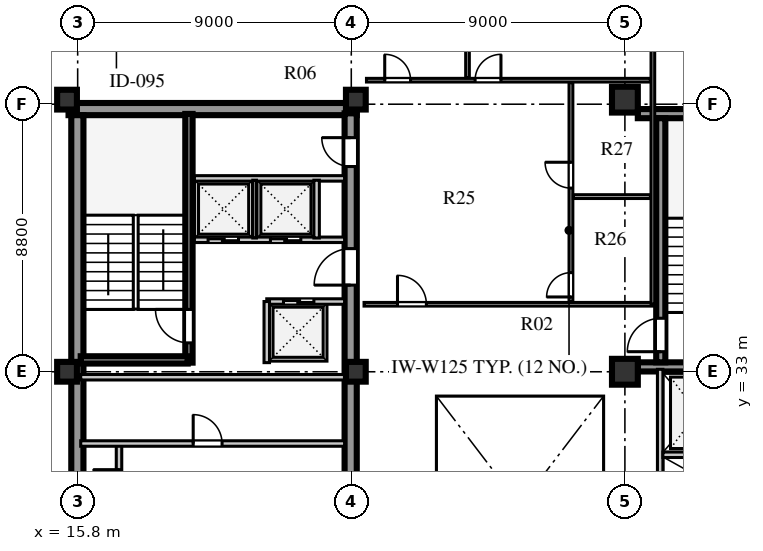
"""IFC4 building model, lengths in metres.
Left out: names, types, materials, properties, quantities, classifications, styles, units other than length and angle.
Written with IfcOpenShell. Run it as: python <this file> out.ifc"""

import sys

from ifc_helpers import new_model, si_unit, direction, frame, frame_2d, origin, origin_2d, place, context, subcontext, project, spatial, rectangle, extrude, element, fill, save


model = new_model("IFC4")
c1 = context("Model", 3, precision=1e-05, world=origin(), true_north=direction((0.0, 1.0)))
c2 = subcontext(c1, "Body", "Model", "MODEL_VIEW")
j1 = project(units=[si_unit("LENGTHUNIT", "METRE"), si_unit("PLANEANGLEUNIT", "RADIAN")], contexts=[c1])
p1 = place(None, origin())
s1 = spatial("IfcSite", under=j1, at=p1, CompositionType="ELEMENT")
p2 = place(p1, origin())
s2 = spatial("IfcBuilding", under=s1, at=p2, CompositionType="ELEMENT")
p3 = place(p2, frame((0.0, 0.0, 221.9)))
s3 = spatial("IfcBuildingStorey", under=s2, at=p3, CompositionType="ELEMENT", Elevation=221.9)
p4 = place(p3, frame((15.5, 41.64, 0.0), z_axis=(0.0, 0.0, 1.0), x_axis=(1.0, 0.0, 0.0)))
e1 = element("IfcWall", 1, at=p4, inside=s3, PredefinedType="SHEAR", context=c2, shape_type="SweptSolid", body=[
    extrude(rectangle(XDim=9.48, YDim=0.4, at=frame_2d((4.74, 0.0))), origin(), (0.0, 0.0, 1.0), 3.66),
])
p5 = place(p3, frame((15.79, 15.81, 0.0), z_axis=(0.0, 0.0, 1.0), x_axis=(0.0, 1.0, 0.0)))
e2 = element("IfcWall", 2, at=p5, inside=s3, PredefinedType="SHEAR", context=c2, shape_type="SweptSolid", body=[
    extrude(rectangle(XDim=25.63, YDim=0.4, at=frame_2d((12.815, 0.0))), origin(), (0.0, 0.0, 1.0), 3.66),
])
p6 = place(p3, frame((24.78, 15.74, 0.0), z_axis=(0.0, 0.0, 1.0), x_axis=(0.0, 1.0, 0.0)))
e3 = element("IfcWall", 3, at=p6, inside=s3, PredefinedType="SHEAR", context=c2, shape_type="SweptSolid", body=[
    extrude(rectangle(XDim=25.76, YDim=0.4, at=frame_2d((12.88, 0.0))), origin(), (0.0, 0.0, 1.0), 3.66),
])
p7 = place(p6, frame((1.61, 0.0, 0.0)))
e4 = element("IfcOpeningElement", 4, at=p7, cuts=e3, PredefinedType="OPENING", context=c2, shape_type="SweptSolid", body=[
    extrude(rectangle(XDim=1.2, YDim=2.1, at=frame_2d((0.6, 1.05))), frame((0.0, 0.21, 0.0), z_axis=(0.0, -1.0, 0.0), x_axis=(1.0, 0.0, 0.0)), (0.0, 0.0, 1.0), 0.42),
])
p8 = place(p6, frame((6.78, 0.0, 0.0)))
e5 = element("IfcOpeningElement", 5, at=p8, cuts=e3, PredefinedType="OPENING", context=c2, shape_type="SweptSolid", body=[
    extrude(rectangle(XDim=0.85, YDim=2.06, at=frame_2d((0.425, 1.03))), frame((0.0, 0.21, 0.0), z_axis=(0.0, -1.0, 0.0), x_axis=(1.0, 0.0, 0.0)), (0.0, 0.0, 1.0), 0.42),
])
p9 = place(p6, frame((12.11, 0.0, 0.0)))
e6 = element("IfcOpeningElement", 6, at=p9, cuts=e3, PredefinedType="OPENING", context=c2, shape_type="SweptSolid", body=[
    extrude(rectangle(XDim=1.5, YDim=2.12, at=frame_2d((0.75, 1.06))), frame((0.0, 0.21, 0.0), z_axis=(0.0, -1.0, 0.0), x_axis=(1.0, 0.0, 0.0)), (0.0, 0.0, 1.0), 0.42),
])
p10 = place(p6, frame((20.11, 0.0, 0.0)))
e7 = element("IfcOpeningElement", 7, at=p10, cuts=e3, PredefinedType="OPENING", context=c2, shape_type="SweptSolid", body=[
    extrude(rectangle(XDim=1.2, YDim=2.12, at=frame_2d((0.6, 1.06))), frame((0.0, 0.21, 0.0), z_axis=(0.0, -1.0, 0.0), x_axis=(1.0, 0.0, 0.0)), (0.0, 0.0, 1.0), 0.42),
])
p11 = place(p6, frame((24.01, 0.0, 0.0)))
e8 = element("IfcOpeningElement", 8, at=p11, cuts=e3, PredefinedType="OPENING", context=c2, shape_type="SweptSolid", body=[
    extrude(rectangle(XDim=0.95, YDim=2.1, at=frame_2d((0.475, 1.05))), frame((0.0, 0.21, 0.0), z_axis=(0.0, -1.0, 0.0), x_axis=(1.0, 0.0, 0.0)), (0.0, 0.0, 1.0), 0.42),
])
for number, where, z_axis, x_axis in (
    (9, (34.225, 33.16, 0.0), (0.0, 0.0, 1.0), (1.0, 0.0, 0.0)),
    (10, (34.225, 41.49, 0.0), (0.0, 0.0, 1.0), (1.0, 0.0, 0.0)),
):
    element("IfcWall", number, at=place(p3, frame(where, z_axis=z_axis, x_axis=x_axis)), inside=s3, PredefinedType="SHEAR", context=c2, shape_type="SweptSolid", body=[
        extrude(rectangle(XDim=4.645, YDim=0.3, at=frame_2d((2.323, 0.0))), origin(), (0.0, 0.0, 1.0), 3.66),
    ])
p12 = place(p3, frame((34.98, 33.31, 0.0), z_axis=(0.0, 0.0, 1.0), x_axis=(0.0, 1.0, 0.0)))
e11 = element("IfcWall", 11, at=p12, inside=s3, PredefinedType="SHEAR", context=c2, shape_type="SweptSolid", body=[
    extrude(rectangle(XDim=8.03, YDim=0.3, at=frame_2d((4.015, 0.0))), origin(), (0.0, 0.0, 1.0), 3.66),
])
p13 = place(p12, frame((0.35, 0.0, 0.0)))
e12 = element("IfcOpeningElement", 12, at=p13, cuts=e11, PredefinedType="OPENING", context=c2, shape_type="SweptSolid", body=[
    extrude(rectangle(XDim=1.1, YDim=2.1, at=frame_2d((0.55, 1.05))), frame((0.0, 0.16, 0.0), z_axis=(0.0, -1.0, 0.0), x_axis=(1.0, 0.0, 0.0)), (0.0, 0.0, 1.0), 0.32),
])
for number, where, z_axis, x_axis in (
    (13, (15.45, 33.0, 0.0), (0.0, 0.0, 1.0), (1.0, 0.0, 0.0)),
    (14, (15.45, 41.95, 0.0), (0.0, 0.0, 1.0), (1.0, 0.0, 0.0)),
    (15, (24.95, 33.0, 0.0), (0.0, 0.0, 1.0), (1.0, 0.0, 0.0)),
    (16, (24.95, 41.95, 0.0), (0.0, 0.0, 1.0), (1.0, 0.0, 0.0)),
):
    element("IfcColumn", number, at=place(p3, frame(where, z_axis=z_axis, x_axis=x_axis)), inside=s3, PredefinedType="COLUMN", context=c2, shape_type="SweptSolid", body=[
        extrude(rectangle(XDim=0.65, YDim=0.65, at=origin_2d()), origin(), (0.0, 0.0, 1.0), 3.66),
    ])
for number, where, z_axis, x_axis in (
    (17, (33.8, 33.0, 0.0), (0.0, 0.0, 1.0), (1.0, 0.0, 0.0)),
    (18, (33.8, 41.95, 0.0), (0.0, 0.0, 1.0), (1.0, 0.0, 0.0)),
):
    element("IfcColumn", number, at=place(p3, frame(where, z_axis=z_axis, x_axis=x_axis)), inside=s3, PredefinedType="COLUMN", context=c2, shape_type="SweptSolid", body=[
        extrude(rectangle(XDim=0.85, YDim=0.85, at=origin_2d()), origin(), (0.0, 0.0, 1.0), 3.66),
    ])
p14 = place(p3, frame((17.16, 26.58, 0.0), z_axis=(0.0, 0.0, 1.0), x_axis=(0.0, 1.0, 0.0)))
e19 = element("IfcWall", 19, at=p14, inside=s3, PredefinedType="SOLIDWALL", context=c2, shape_type="SweptSolid", body=[
    extrude(rectangle(XDim=4.02, YDim=0.18, at=frame_2d((2.01, 0.0))), origin(), (0.0, 0.0, 1.0), 3.66),
])
p15 = place(p14, frame((2.35, 0.0, 0.0)))
e20 = element("IfcOpeningElement", 20, at=p15, cuts=e19, PredefinedType="OPENING", context=c2, shape_type="SweptSolid", body=[
    extrude(rectangle(XDim=0.85, YDim=2.06, at=frame_2d((0.425, 1.03))), frame((0.0, 0.1, 0.0), z_axis=(0.0, -1.0, 0.0), x_axis=(1.0, 0.0, 0.0)), (0.0, 0.0, 1.0), 0.2),
])
p16 = place(p3, frame((15.9, 30.64, 0.0), z_axis=(0.0, 0.0, 1.0), x_axis=(1.0, 0.0, 0.0)))
e21 = element("IfcWall", 21, at=p16, inside=s3, PredefinedType="SOLIDWALL", context=c2, shape_type="SweptSolid", body=[
    extrude(rectangle(XDim=8.68, YDim=0.18, at=frame_2d((4.34, 0.0))), origin(), (0.0, 0.0, 1.0), 3.66),
])
p17 = place(p16, frame((3.7, 0.0, 0.0)))
e22 = element("IfcOpeningElement", 22, at=p17, cuts=e21, PredefinedType="OPENING", context=c2, shape_type="SweptSolid", body=[
    extrude(rectangle(XDim=0.95, YDim=2.1, at=frame_2d((0.475, 1.05))), frame((0.0, 0.1, 0.0), z_axis=(0.0, -1.0, 0.0), x_axis=(1.0, 0.0, 0.0)), (0.0, 0.0, 1.0), 0.2),
])
p18 = place(p3, frame((15.9, 32.82, 0.0), z_axis=(0.0, 0.0, 1.0), x_axis=(1.0, 0.0, 0.0)))
e23 = element("IfcWall", 23, at=p18, inside=s3, PredefinedType="SOLIDWALL", context=c2, shape_type="SweptSolid", body=[
    extrude(rectangle(XDim=8.68, YDim=0.18, at=frame_2d((4.34, 0.0))), origin(), (0.0, 0.0, 1.0), 3.06),
])
p19 = place(p3, frame((19.46, 33.3, 0.0), z_axis=(0.0, 0.0, 1.0), x_axis=(0.0, 1.0, 0.0)))
e24 = element("IfcWall", 24, at=p19, inside=s3, PredefinedType="SHEAR", context=c2, shape_type="SweptSolid", body=[
    extrude(rectangle(XDim=8.18, YDim=0.24, at=frame_2d((4.09, 0.0))), origin(), (0.0, 0.0, 1.0), 3.9),
])
p20 = place(p19, frame((0.65, 0.0, 0.0)))
e25 = element("IfcOpeningElement", 25, at=p20, cuts=e24, PredefinedType="OPENING", context=c2, shape_type="SweptSolid", body=[
    extrude(rectangle(XDim=1.1, YDim=2.1, at=frame_2d((0.55, 1.05))), frame((0.0, 0.13, 0.0), z_axis=(0.0, -1.0, 0.0), x_axis=(1.0, 0.0, 0.0)), (0.0, 0.0, 1.0), 0.26),
])
p21 = place(p3, frame((15.9, 33.39, 0.0), z_axis=(0.0, 0.0, 1.0), x_axis=(1.0, 0.0, 0.0)))
e26 = element("IfcWall", 26, at=p21, inside=s3, PredefinedType="SHEAR", context=c2, shape_type="SweptSolid", body=[
    extrude(rectangle(XDim=3.52, YDim=0.24, at=frame_2d((1.76, 0.0))), origin(), (0.0, 0.0, 1.0), 3.9),
])
p22 = place(p3, frame((22.02, 35.31, 0.0), z_axis=(0.0, 0.0, 1.0), x_axis=(1.0, 0.0, 0.0)))
e27 = element("IfcWall", 27, at=p22, inside=s3, PredefinedType="SOLIDWALL", context=c2, shape_type="SweptSolid", body=[
    extrude(rectangle(XDim=2.56, YDim=0.18, at=frame_2d((1.28, 0.0))), origin(), (0.0, 0.0, 1.0), 3.66),
])
p23 = place(p22, frame((0.55, 0.0, 0.0)))
e28 = element("IfcOpeningElement", 28, at=p23, cuts=e27, PredefinedType="OPENING", context=c2, shape_type="SweptSolid", body=[
    extrude(rectangle(XDim=1.0, YDim=2.1, at=frame_2d((0.5, 1.05))), frame((0.0, 0.1, 0.0), z_axis=(0.0, -1.0, 0.0), x_axis=(1.0, 0.0, 0.0)), (0.0, 0.0, 1.0), 0.2),
])
p24 = place(p3, frame((22.02, 33.3, 0.0), z_axis=(0.0, 0.0, 1.0), x_axis=(0.0, 1.0, 0.0)))
e29 = element("IfcWall", 29, at=p24, inside=s3, PredefinedType="SOLIDWALL", context=c2, shape_type="SweptSolid", body=[
    extrude(rectangle(XDim=2.01, YDim=0.18, at=frame_2d((1.005, 0.0))), origin(), (0.0, 0.0, 1.0), 3.66),
])
p25 = place(p3, frame((19.64, 37.34, 0.0), z_axis=(0.0, 0.0, 1.0), x_axis=(1.0, 0.0, 0.0)))
e30 = element("IfcWall", 30, at=p25, inside=s3, PredefinedType="SOLIDWALL", context=c2, shape_type="SweptSolid", body=[
    extrude(rectangle(XDim=4.94, YDim=0.18, at=frame_2d((2.47, 0.0))), origin(), (0.0, 0.0, 1.0), 3.66),
])
p26 = place(p25, frame((0.45, 0.0, 0.0)))
e31 = element("IfcOpeningElement", 31, at=p26, cuts=e30, PredefinedType="OPENING", context=c2, shape_type="SweptSolid", body=[
    extrude(rectangle(XDim=1.0, YDim=2.1, at=frame_2d((0.5, 1.05))), frame((0.0, 0.1, 0.0), z_axis=(0.0, -1.0, 0.0), x_axis=(1.0, 0.0, 0.0)), (0.0, 0.0, 1.0), 0.2),
])
p27 = place(p25, frame((2.5, 0.0, 0.0)))
e32 = element("IfcOpeningElement", 32, at=p27, cuts=e30, PredefinedType="OPENING", context=c2, shape_type="SweptSolid", body=[
    extrude(rectangle(XDim=1.0, YDim=2.1, at=frame_2d((0.5, 1.05))), frame((0.0, 0.1, 0.0), z_axis=(0.0, -1.0, 0.0), x_axis=(1.0, 0.0, 0.0)), (0.0, 0.0, 1.0), 0.2),
])
p28 = place(p3, frame((19.64, 39.36, 0.0), z_axis=(0.0, 0.0, 1.0), x_axis=(1.0, 0.0, 0.0)))
e33 = element("IfcWall", 33, at=p28, inside=s3, PredefinedType="SOLIDWALL", context=c2, shape_type="SweptSolid", body=[
    extrude(rectangle(XDim=4.94, YDim=0.18, at=frame_2d((2.47, 0.0))), origin(), (0.0, 0.0, 1.0), 3.66),
])
p29 = place(p3, frame((21.62, 37.4, 0.0), z_axis=(0.0, 0.0, 1.0), x_axis=(0.0, 1.0, 0.0)))
e34 = element("IfcWall", 34, at=p29, inside=s3, PredefinedType="PARTITIONING", context=c2, shape_type="SweptSolid", body=[
    extrude(rectangle(XDim=1.9, YDim=0.12, at=frame_2d((0.95, 0.0))), origin(), (0.0, 0.0, 1.0), 3.66),
])
p30 = place(p3, frame((23.66, 37.4, 0.0), z_axis=(0.0, 0.0, 1.0), x_axis=(0.0, 1.0, 0.0)))
e35 = element("IfcWall", 35, at=p30, inside=s3, PredefinedType="SOLIDWALL", context=c2, shape_type="SweptSolid", body=[
    extrude(rectangle(XDim=1.9, YDim=0.18, at=frame_2d((0.95, 0.0))), origin(), (0.0, 0.0, 1.0), 3.66),
])
p31 = place(p3, frame((34.96, 28.86, 0.0), z_axis=(0.0, 0.0, 1.0), x_axis=(0.0, 1.0, 0.0)))
e36 = element("IfcWall", 36, at=p31, inside=s3, PredefinedType="SOLIDWALL", context=c2, shape_type="SweptSolid", body=[
    extrude(rectangle(XDim=4.22, YDim=0.18, at=frame_2d((2.11, 0.0))), origin(), (0.0, 0.0, 1.0), 3.66),
])
p32 = place(p3, frame((35.05, 30.27, 0.0), z_axis=(0.0, 0.0, 1.0), x_axis=(1.0, 0.0, 0.0)))
e37 = element("IfcWall", 37, at=p32, inside=s3, PredefinedType="SOLIDWALL", context=c2, shape_type="SweptSolid", body=[
    extrude(rectangle(XDim=2.25, YDim=0.18, at=frame_2d((1.125, 0.0))), origin(), (0.0, 0.0, 1.0), 3.66),
])
p33 = place(p3, frame((25.22, 35.22, 0.0), z_axis=(0.0, 0.0, 1.0), x_axis=(1.0, 0.0, 0.0)))
e38 = element("IfcWall", 38, at=p33, inside=s3, PredefinedType="PARTITIONING", context=c2, shape_type="SweptSolid", body=[
    extrude(rectangle(XDim=9.5, YDim=0.12, at=frame_2d((4.75, 0.0))), origin(), (0.0, 0.0, 1.0), 3.66),
])
p34 = place(p33, frame((1.1, 0.0, 0.0)))
e39 = element("IfcOpeningElement", 39, at=p34, cuts=e38, PredefinedType="OPENING", context=c2, shape_type="SweptSolid", body=[
    extrude(rectangle(XDim=0.95, YDim=2.1, at=frame_2d((0.475, 1.05))), frame((0.0, 0.07, 0.0), z_axis=(0.0, -1.0, 0.0), x_axis=(1.0, 0.0, 0.0)), (0.0, 0.0, 1.0), 0.14),
])
p35 = place(p3, frame((34.72, 35.22, 0.0), z_axis=(0.0, 0.0, 1.0), x_axis=(0.0, 1.0, 0.0)))
e40 = element("IfcWall", 40, at=p35, inside=s3, PredefinedType="PARTITIONING", context=c2, shape_type="SweptSolid", body=[
    extrude(rectangle(XDim=14.1, YDim=0.12, at=frame_2d((7.05, 0.0))), origin(), (0.0, 0.0, 1.0), 3.66),
])
p36 = place(p3, frame((25.3, 42.59, 0.0), z_axis=(0.0, 0.0, 1.0), x_axis=(1.0, 0.0, 0.0)))
e41 = element("IfcWall", 41, at=p36, inside=s3, PredefinedType="PARTITIONING", context=c2, shape_type="SweptSolid", body=[
    extrude(rectangle(XDim=9.34, YDim=0.12, at=frame_2d((4.67, 0.0))), origin(), (0.0, 0.0, 1.0), 3.66),
])
p37 = place(p36, frame((0.6, 0.0, 0.0)))
e42 = element("IfcOpeningElement", 42, at=p37, cuts=e41, PredefinedType="OPENING", context=c2, shape_type="SweptSolid", body=[
    extrude(rectangle(XDim=0.85, YDim=2.08, at=frame_2d((0.425, 1.04))), frame((0.0, 0.07, 0.0), z_axis=(0.0, -1.0, 0.0), x_axis=(1.0, 0.0, 0.0)), (0.0, 0.0, 1.0), 0.14),
])
p38 = place(p36, frame((3.573, 0.0, 0.0)))
e43 = element("IfcOpeningElement", 43, at=p38, cuts=e41, PredefinedType="OPENING", context=c2, shape_type="SweptSolid", body=[
    extrude(rectangle(XDim=0.85, YDim=2.08, at=frame_2d((0.425, 1.04))), frame((0.0, 0.07, 0.0), z_axis=(0.0, -1.0, 0.0), x_axis=(1.0, 0.0, 0.0)), (0.0, 0.0, 1.0), 0.14),
])
p39 = place(p3, frame((32.025, 35.3, 0.0), z_axis=(0.0, 0.0, 1.0), x_axis=(0.0, 1.0, 0.0)))
e44 = element("IfcWall", 44, at=p39, inside=s3, PredefinedType="PLUMBINGWALL", context=c2, shape_type="SweptSolid", body=[
    extrude(rectangle(XDim=7.21, YDim=0.125, at=frame_2d((3.605, 0.0))), origin(), (0.0, 0.0, 1.0), 3.66),
])
p40 = place(p39, frame((0.16, 0.0, 0.0)))
e45 = element("IfcOpeningElement", 45, at=p40, cuts=e44, PredefinedType="OPENING", context=c2, shape_type="SweptSolid", body=[
    extrude(rectangle(XDim=0.8, YDim=2.05, at=frame_2d((0.4, 1.025))), frame((0.0, 0.073, 0.0), z_axis=(0.0, -1.0, 0.0), x_axis=(1.0, 0.0, 0.0)), (0.0, 0.0, 1.0), 0.145),
])
p41 = place(p39, frame((3.741, 0.0, 0.0)))
e46 = element("IfcOpeningElement", 46, at=p41, cuts=e44, PredefinedType="OPENING", context=c2, shape_type="SweptSolid", body=[
    extrude(rectangle(XDim=0.85, YDim=2.08, at=frame_2d((0.425, 1.04))), frame((0.0, 0.073, 0.0), z_axis=(0.0, -1.0, 0.0), x_axis=(1.0, 0.0, 0.0)), (0.0, 0.0, 1.0), 0.145),
])
p42 = place(p3, frame((32.105, 38.761, 0.0), z_axis=(0.0, 0.0, 1.0), x_axis=(1.0, 0.0, 0.0)))
e47 = element("IfcWall", 47, at=p42, inside=s3, PredefinedType="PLUMBINGWALL", context=c2, shape_type="SweptSolid", body=[
    extrude(rectangle(XDim=2.535, YDim=0.125, at=frame_2d((1.268, 0.0))), origin(), (0.0, 0.0, 1.0), 3.66),
])
p43 = place(p3, frame((28.623, 42.67, 0.0), z_axis=(0.0, 0.0, 1.0), x_axis=(0.0, 1.0, 0.0)))
e48 = element("IfcWall", 48, at=p43, inside=s3, PredefinedType="PARTITIONING", context=c2, shape_type="SweptSolid", body=[
    extrude(rectangle(XDim=6.65, YDim=0.12, at=frame_2d((3.325, 0.0))), origin(), (0.0, 0.0, 1.0), 3.66),
])
p44 = place(p15, origin())
e49 = element("IfcDoor", 49, at=p44, inside=s3, OperationType="SINGLE_SWING_RIGHT", PredefinedType="DOOR", context=c2, shape_type="SweptSolid", body=[
    extrude(rectangle(XDim=0.85, YDim=2.06, at=frame_2d((0.425, 1.03))), frame((0.0, 0.025, 0.0), z_axis=(0.0, -1.0, 0.0), x_axis=(1.0, 0.0, 0.0)), (0.0, 0.0, 1.0), 0.05),
])
fill(e20, e49)
p45 = place(p17, frame((0.95, 0.0, 0.0), z_axis=(0.0, 0.0, 1.0), x_axis=(-1.0, 0.0, 0.0)))
e50 = element("IfcDoor", 50, at=p45, inside=s3, OperationType="SINGLE_SWING_RIGHT", PredefinedType="DOOR", context=c2, shape_type="SweptSolid", body=[
    extrude(rectangle(XDim=0.95, YDim=2.1, at=frame_2d((0.475, 1.05))), frame((0.0, 0.025, 0.0), z_axis=(0.0, -1.0, 0.0), x_axis=(1.0, 0.0, 0.0)), (0.0, 0.0, 1.0), 0.05),
])
fill(e22, e50)
p46 = place(p20, origin())
e51 = element("IfcDoor", 51, at=p46, inside=s3, OperationType="SINGLE_SWING_RIGHT", PredefinedType="DOOR", context=c2, shape_type="SweptSolid", body=[
    extrude(rectangle(XDim=1.1, YDim=2.1, at=frame_2d((0.55, 1.05))), frame((0.0, 0.025, 0.0), z_axis=(0.0, -1.0, 0.0), x_axis=(1.0, 0.0, 0.0)), (0.0, 0.0, 1.0), 0.05),
])
fill(e25, e51)
p47 = place(p10, frame((1.2, 0.0, 0.0), z_axis=(0.0, 0.0, 1.0), x_axis=(-1.0, 0.0, 0.0)))
e52 = element("IfcDoor", 52, at=p47, inside=s3, OperationType="SINGLE_SWING_RIGHT", PredefinedType="DOOR", context=c2, shape_type="SweptSolid", body=[
    extrude(rectangle(XDim=1.2, YDim=2.12, at=frame_2d((0.6, 1.06))), frame((0.0, 0.025, 0.0), z_axis=(0.0, -1.0, 0.0), x_axis=(1.0, 0.0, 0.0)), (0.0, 0.0, 1.0), 0.05),
])
fill(e7, e52)
p48 = place(p26, frame((1.0, 0.0, 0.0), z_axis=(0.0, 0.0, 1.0), x_axis=(-1.0, 0.0, 0.0)))
e53 = element("IfcDoor", 53, at=p48, inside=s3, OperationType="DOUBLE_DOOR_SLIDING", PredefinedType="DOOR", context=c2, shape_type="SweptSolid", body=[
    extrude(rectangle(XDim=1.0, YDim=2.1, at=frame_2d((0.5, 1.05))), frame((0.0, 0.025, 0.0), z_axis=(0.0, -1.0, 0.0), x_axis=(1.0, 0.0, 0.0)), (0.0, 0.0, 1.0), 0.05),
])
fill(e31, e53)
p49 = place(p27, frame((1.0, 0.0, 0.0), z_axis=(0.0, 0.0, 1.0), x_axis=(-1.0, 0.0, 0.0)))
e54 = element("IfcDoor", 54, at=p49, inside=s3, OperationType="DOUBLE_DOOR_SLIDING", PredefinedType="DOOR", context=c2, shape_type="SweptSolid", body=[
    extrude(rectangle(XDim=1.0, YDim=2.1, at=frame_2d((0.5, 1.05))), frame((0.0, 0.025, 0.0), z_axis=(0.0, -1.0, 0.0), x_axis=(1.0, 0.0, 0.0)), (0.0, 0.0, 1.0), 0.05),
])
fill(e32, e54)
p50 = place(p23, origin())
e55 = element("IfcDoor", 55, at=p50, inside=s3, OperationType="DOUBLE_DOOR_SLIDING", PredefinedType="DOOR", context=c2, shape_type="SweptSolid", body=[
    extrude(rectangle(XDim=1.0, YDim=2.1, at=frame_2d((0.5, 1.05))), frame((0.0, 0.025, 0.0), z_axis=(0.0, -1.0, 0.0), x_axis=(1.0, 0.0, 0.0)), (0.0, 0.0, 1.0), 0.05),
])
fill(e28, e55)
p51 = place(p11, frame((0.95, 0.0, 0.0), z_axis=(0.0, 0.0, 1.0), x_axis=(-1.0, 0.0, 0.0)))
e56 = element("IfcDoor", 56, at=p51, inside=s3, OperationType="SINGLE_SWING_LEFT", PredefinedType="DOOR", context=c2, shape_type="SweptSolid", body=[
    extrude(rectangle(XDim=0.95, YDim=2.1, at=frame_2d((0.475, 1.05))), frame((0.0, 0.025, 0.0), z_axis=(0.0, -1.0, 0.0), x_axis=(1.0, 0.0, 0.0)), (0.0, 0.0, 1.0), 0.05),
])
fill(e8, e56)
p52 = place(p13, origin())
e57 = element("IfcDoor", 57, at=p52, inside=s3, OperationType="SINGLE_SWING_LEFT", PredefinedType="DOOR", context=c2, shape_type="SweptSolid", body=[
    extrude(rectangle(XDim=1.1, YDim=2.1, at=frame_2d((0.55, 1.05))), frame((0.0, 0.025, 0.0), z_axis=(0.0, -1.0, 0.0), x_axis=(1.0, 0.0, 0.0)), (0.0, 0.0, 1.0), 0.05),
])
fill(e12, e57)
p53 = place(p40, origin())
e58 = element("IfcDoor", 58, at=p53, inside=s3, OperationType="SINGLE_SWING_LEFT", PredefinedType="DOOR", context=c2, shape_type="SweptSolid", body=[
    extrude(rectangle(XDim=0.8, YDim=2.05, at=frame_2d((0.4, 1.025))), frame((0.0, 0.025, 0.0), z_axis=(0.0, -1.0, 0.0), x_axis=(1.0, 0.0, 0.0)), (0.0, 0.0, 1.0), 0.05),
])
fill(e45, e58)
p54 = place(p41, origin())
e59 = element("IfcDoor", 59, at=p54, inside=s3, OperationType="SINGLE_SWING_RIGHT", PredefinedType="DOOR", context=c2, shape_type="SweptSolid", body=[
    extrude(rectangle(XDim=0.85, YDim=2.08, at=frame_2d((0.425, 1.04))), frame((0.0, 0.025, 0.0), z_axis=(0.0, -1.0, 0.0), x_axis=(1.0, 0.0, 0.0)), (0.0, 0.0, 1.0), 0.05),
])
fill(e46, e59)
p55 = place(p37, origin())
e60 = element("IfcDoor", 60, at=p55, inside=s3, OperationType="SINGLE_SWING_LEFT", PredefinedType="DOOR", context=c2, shape_type="SweptSolid", body=[
    extrude(rectangle(XDim=0.85, YDim=2.08, at=frame_2d((0.425, 1.04))), frame((0.0, 0.025, 0.0), z_axis=(0.0, -1.0, 0.0), x_axis=(1.0, 0.0, 0.0)), (0.0, 0.0, 1.0), 0.05),
])
fill(e42, e60)
p56 = place(p38, origin())
e61 = element("IfcDoor", 61, at=p56, inside=s3, OperationType="SINGLE_SWING_RIGHT", PredefinedType="DOOR", context=c2, shape_type="SweptSolid", body=[
    extrude(rectangle(XDim=0.85, YDim=2.08, at=frame_2d((0.425, 1.04))), frame((0.0, 0.025, 0.0), z_axis=(0.0, -1.0, 0.0), x_axis=(1.0, 0.0, 0.0)), (0.0, 0.0, 1.0), 0.05),
])
fill(e43, e61)
p57 = place(p34, origin())
e62 = element("IfcDoor", 62, at=p57, inside=s3, OperationType="SINGLE_SWING_LEFT", PredefinedType="DOOR", context=c2, shape_type="SweptSolid", body=[
    extrude(rectangle(XDim=0.95, YDim=2.1, at=frame_2d((0.475, 1.05))), frame((0.0, 0.025, 0.0), z_axis=(0.0, -1.0, 0.0), x_axis=(1.0, 0.0, 0.0)), (0.0, 0.0, 1.0), 0.05),
])
fill(e39, e62)
save(model, sys.argv[1])
